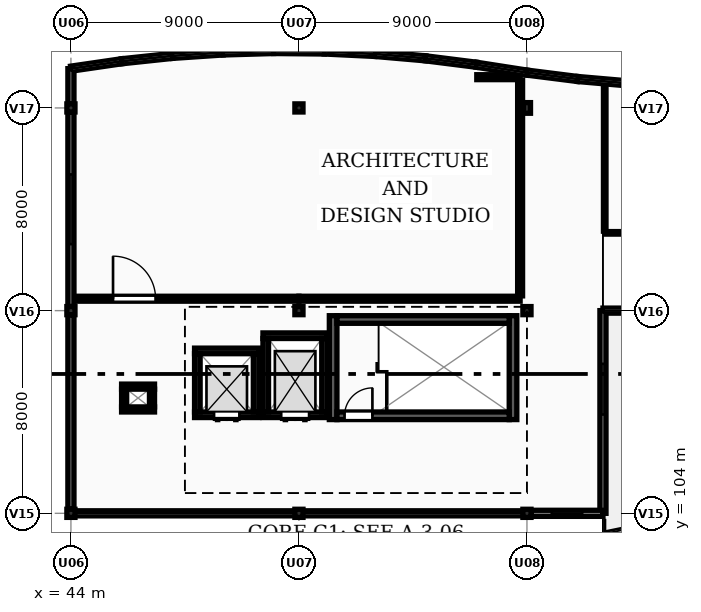
"""IFC4 building model, lengths in metres.
Left out: names, types, materials, properties, quantities, classifications, styles, units other than length and angle.
Written with IfcOpenShell. Run it as: python <this file> out.ifc"""

import sys

from ifc_helpers import new_model, si_unit, direction, frame, frame_2d, origin, origin_2d, place, context, subcontext, project, spatial, rectangle, extrude, element, fill, save


model = new_model("IFC4")
c1 = context("Model", 3, precision=1e-05, world=origin(), true_north=direction((0.0, 1.0)))
c2 = subcontext(c1, "Body", "Model", "MODEL_VIEW")
j1 = project(units=[si_unit("LENGTHUNIT", "METRE"), si_unit("PLANEANGLEUNIT", "RADIAN")], contexts=[c1])
p1 = place(None, origin())
s1 = spatial("IfcSite", under=j1, at=p1, CompositionType="ELEMENT")
p2 = place(p1, origin())
s2 = spatial("IfcBuilding", under=s1, at=p2, CompositionType="ELEMENT")
p3 = place(p2, frame((0.0, 0.0, 20.1)))
s3 = spatial("IfcBuildingStorey", under=s2, at=p3, CompositionType="ELEMENT", Elevation=20.1)
p4 = place(p3, frame((44.0, 104.0, 0.0), z_axis=(0.0, 0.0, 1.0), x_axis=(1.0, 0.0, 0.0)))
e1 = element("IfcColumn", 1, at=p4, inside=s3, PredefinedType="COLUMN", context=c2, shape_type="SweptSolid", body=[
    extrude(rectangle(XDim=0.32, YDim=0.32, at=origin_2d()), origin(), (0.0, 0.0, 1.0), 4.123),
])
p5 = place(p3, frame((44.0, 112.0, 0.0), z_axis=(0.0, 0.0, 1.0), x_axis=(1.0, 0.0, 0.0)))
e2 = element("IfcColumn", 2, at=p5, inside=s3, PredefinedType="COLUMN", context=c2, shape_type="SweptSolid", body=[
    extrude(rectangle(XDim=0.32, YDim=0.32, at=origin_2d()), origin(), (0.0, 0.0, 1.0), 4.468),
])
p6 = place(p3, frame((44.0, 120.0, 0.0), z_axis=(0.0, 0.0, 1.0), x_axis=(1.0, 0.0, 0.0)))
e3 = element("IfcColumn", 3, at=p6, inside=s3, PredefinedType="COLUMN", context=c2, shape_type="SweptSolid", body=[
    extrude(rectangle(XDim=0.32, YDim=0.32, at=origin_2d()), origin(), (0.0, 0.0, 1.0), 4.813),
])
p7 = place(p3, frame((53.0, 104.0, 0.0), z_axis=(0.0, 0.0, 1.0), x_axis=(1.0, 0.0, 0.0)))
e4 = element("IfcColumn", 4, at=p7, inside=s3, PredefinedType="COLUMN", context=c2, shape_type="SweptSolid", body=[
    extrude(rectangle(XDim=0.32, YDim=0.32, at=origin_2d()), origin(), (0.0, 0.0, 1.0), 3.801),
])
p8 = place(p3, frame((53.0, 112.0, 0.0), z_axis=(0.0, 0.0, 1.0), x_axis=(1.0, 0.0, 0.0)))
e5 = element("IfcColumn", 5, at=p8, inside=s3, PredefinedType="COLUMN", context=c2, shape_type="SweptSolid", body=[
    extrude(rectangle(XDim=0.32, YDim=0.32, at=origin_2d()), origin(), (0.0, 0.0, 1.0), 4.146),
])
p9 = place(p3, frame((53.0, 120.0, 0.0), z_axis=(0.0, 0.0, 1.0), x_axis=(1.0, 0.0, 0.0)))
e6 = element("IfcColumn", 6, at=p9, inside=s3, PredefinedType="COLUMN", context=c2, shape_type="SweptSolid", body=[
    extrude(rectangle(XDim=0.32, YDim=0.32, at=origin_2d()), origin(), (0.0, 0.0, 1.0), 4.491),
])
p10 = place(p3, frame((62.0, 104.0, 0.0), z_axis=(0.0, 0.0, 1.0), x_axis=(1.0, 0.0, 0.0)))
e7 = element("IfcColumn", 7, at=p10, inside=s3, PredefinedType="COLUMN", context=c2, shape_type="SweptSolid", body=[
    extrude(rectangle(XDim=0.32, YDim=0.32, at=origin_2d()), origin(), (0.0, 0.0, 1.0), 3.479),
])
p11 = place(p3, frame((62.0, 112.0, 0.0), z_axis=(0.0, 0.0, 1.0), x_axis=(1.0, 0.0, 0.0)))
e8 = element("IfcColumn", 8, at=p11, inside=s3, PredefinedType="COLUMN", context=c2, shape_type="SweptSolid", body=[
    extrude(rectangle(XDim=0.32, YDim=0.32, at=origin_2d()), origin(), (0.0, 0.0, 1.0), 3.824),
])
p12 = place(p3, frame((62.0, 120.0, 0.0), z_axis=(0.0, 0.0, 1.0), x_axis=(1.0, 0.0, 0.0)))
e9 = element("IfcColumn", 9, at=p12, inside=s3, PredefinedType="PILASTER", context=c2, shape_type="SweptSolid", body=[
    extrude(rectangle(XDim=0.28, YDim=0.42, at=origin_2d()), origin(), (0.0, 0.0, 1.0), 4.169),
])
p13 = place(p3, frame((44.0, 121.55, 0.0), z_axis=(0.0, 0.0, 1.0), x_axis=(0.989544477223, 0.144228040259, 0.0)))
e10 = element("IfcWall", 10, at=p13, inside=s3, PredefinedType="SOLIDWALL", context=c2, shape_type="SweptSolid", body=[
    extrude(rectangle(XDim=2.021, YDim=0.2, at=frame_2d((1.011, 0.0))), origin(), (0.0, 0.0, 1.0), 0.95),
])
p14 = place(p3, frame((46.0, 121.842, 0.0), z_axis=(0.0, 0.0, 1.0), x_axis=(0.994395160059, 0.105727317433, 0.0)))
e11 = element("IfcWall", 11, at=p14, inside=s3, PredefinedType="SOLIDWALL", context=c2, shape_type="SweptSolid", body=[
    extrude(rectangle(XDim=2.011, YDim=0.2, at=frame_2d((1.006, 0.0))), origin(), (0.0, 0.0, 1.0), 0.95),
])
p15 = place(p3, frame((48.0, 122.054, 0.0), z_axis=(0.0, 0.0, 1.0), x_axis=(0.997729302978, 0.067351599676, 0.0)))
e12 = element("IfcWall", 12, at=p15, inside=s3, PredefinedType="SOLIDWALL", context=c2, shape_type="SweptSolid", body=[
    extrude(rectangle(XDim=2.005, YDim=0.2, at=frame_2d((1.002, 0.0))), origin(), (0.0, 0.0, 1.0), 0.95),
])
p16 = place(p3, frame((50.0, 122.189, 0.0), z_axis=(0.0, 0.0, 1.0), x_axis=(0.999581770858, 0.028918564416, 0.0)))
e13 = element("IfcWall", 13, at=p16, inside=s3, PredefinedType="SOLIDWALL", context=c2, shape_type="SweptSolid", body=[
    extrude(rectangle(XDim=2.001, YDim=0.2, at=frame_2d((1.0, 0.0))), origin(), (0.0, 0.0, 1.0), 0.95),
])
p17 = place(p3, frame((52.0, 122.247, 0.0), z_axis=(0.0, 0.0, 1.0), x_axis=(0.999953504169, -0.009643106302, 0.0)))
e14 = element("IfcWall", 14, at=p17, inside=s3, PredefinedType="SOLIDWALL", context=c2, shape_type="SweptSolid", body=[
    extrude(rectangle(XDim=2.0, YDim=0.2, at=frame_2d((1.0, 0.0))), origin(), (0.0, 0.0, 1.0), 0.95),
])
p18 = place(p3, frame((54.0, 122.228, 0.0), z_axis=(0.0, 0.0, 1.0), x_axis=(0.99884540439, -0.048040172037, 0.0)))
e15 = element("IfcWall", 15, at=p18, inside=s3, PredefinedType="SOLIDWALL", context=c2, shape_type="SweptSolid", body=[
    extrude(rectangle(XDim=2.002, YDim=0.2, at=frame_2d((1.001, 0.0))), origin(), (0.0, 0.0, 1.0), 0.95),
])
p19 = place(p3, frame((56.0, 122.132, 0.0), z_axis=(0.0, 0.0, 1.0), x_axis=(0.996244237948, -0.086587633962, 0.0)))
e16 = element("IfcWall", 16, at=p19, inside=s3, PredefinedType="SOLIDWALL", context=c2, shape_type="SweptSolid", body=[
    extrude(rectangle(XDim=2.008, YDim=0.2, at=frame_2d((1.004, 0.0))), origin(), (0.0, 0.0, 1.0), 0.95),
])
p20 = place(p3, frame((58.0, 121.958, 0.0), z_axis=(0.0, 0.0, 1.0), x_axis=(0.992158168336, -0.124988675503, 0.0)))
e17 = element("IfcWall", 17, at=p20, inside=s3, PredefinedType="SOLIDWALL", context=c2, shape_type="SweptSolid", body=[
    extrude(rectangle(XDim=2.016, YDim=0.2, at=frame_2d((1.008, 0.0))), origin(), (0.0, 0.0, 1.0), 0.95),
])
p21 = place(p3, frame((60.0, 121.706, 0.0), z_axis=(0.0, 0.0, 1.0), x_axis=(0.988085509852, -0.153905897287, 0.0)))
e18 = element("IfcWall", 18, at=p21, inside=s3, PredefinedType="SOLIDWALL", context=c2, shape_type="SweptSolid", body=[
    extrude(rectangle(XDim=2.024, YDim=0.2, at=frame_2d((1.012, 0.0))), origin(), (0.0, 0.0, 1.0), 0.95),
])
p22 = place(p3, frame((62.0, 121.394, 0.0), z_axis=(0.0, 0.0, 1.0), x_axis=(0.992158168336, -0.124988675503, 0.0)))
e19 = element("IfcWall", 19, at=p22, inside=s3, PredefinedType="SOLIDWALL", context=c2, shape_type="SweptSolid", body=[
    extrude(rectangle(XDim=2.016, YDim=0.2, at=frame_2d((1.008, 0.0))), origin(), (0.0, 0.0, 1.0), 0.95),
])
p23 = place(p3, frame((64.0, 121.142, 0.0), z_axis=(0.0, 0.0, 1.0), x_axis=(0.996244237948, -0.086587633962, 0.0)))
e20 = element("IfcWall", 20, at=p23, inside=s3, PredefinedType="SOLIDWALL", context=c2, shape_type="SweptSolid", body=[
    extrude(rectangle(XDim=2.008, YDim=0.2, at=frame_2d((1.004, 0.0))), origin(), (0.0, 0.0, 1.0), 0.95),
])
p24 = place(p3, frame((70.84, 112.0, 0.0), z_axis=(0.0, 0.0, 1.0), x_axis=(-1.0, 0.0, 0.0)))
e21 = element("IfcWall", 21, at=p24, inside=s3, PredefinedType="SOLIDWALL", context=c2, shape_type="SweptSolid", body=[
    extrude(rectangle(XDim=5.84, YDim=0.2, at=frame_2d((2.92, 0.0))), origin(), (0.0, 0.0, 1.0), 0.95),
])
p25 = place(p3, frame((65.0, 112.0, 0.0), z_axis=(0.0, 0.0, 1.0), x_axis=(0.0, -1.0, 0.0)))
e22 = element("IfcWall", 22, at=p25, inside=s3, PredefinedType="SOLIDWALL", context=c2, shape_type="SweptSolid", body=[
    extrude(rectangle(XDim=8.0, YDim=0.24, at=frame_2d((4.0, 0.0))), origin(), (0.0, 0.0, 1.0), 3.372),
])
p26 = place(p25, frame((2.1, 0.0, 0.95)))
e23 = element("IfcOpeningElement", 23, at=p26, cuts=e22, PredefinedType="OPENING", context=c2, shape_type="SweptSolid", body=[
    extrude(rectangle(XDim=2.0, YDim=1.65, at=frame_2d((1.0, 0.825))), frame((0.0, 0.13, 0.0), z_axis=(0.0, -1.0, 0.0), x_axis=(1.0, 0.0, 0.0)), (0.0, 0.0, 1.0), 0.26),
])
p27 = place(p3, frame((65.0, 104.0, 0.0), z_axis=(0.0, 0.0, 1.0), x_axis=(-1.0, 0.0, 0.0)))
e24 = element("IfcWall", 24, at=p27, inside=s3, PredefinedType="SOLIDWALL", context=c2, shape_type="SweptSolid", body=[
    extrude(rectangle(XDim=2.84, YDim=0.24, at=frame_2d((1.42, 0.0))), origin(), (0.0, 0.0, 1.0), 3.372),
])
p28 = place(p27, frame((0.82, 0.0, 0.95)))
e25 = element("IfcOpeningElement", 25, at=p28, cuts=e24, PredefinedType="OPENING", context=c2, shape_type="SweptSolid", body=[
    extrude(rectangle(XDim=1.2, YDim=1.2, at=frame_2d((0.6, 0.6))), frame((0.0, 0.13, 0.0), z_axis=(0.0, -1.0, 0.0), x_axis=(1.0, 0.0, 0.0)), (0.0, 0.0, 1.0), 0.26),
])
for number, where, z_axis, x_axis in (
    (26, (61.84, 104.0, 0.0), (0.0, 0.0, 1.0), (-1.0, 0.0, 0.0)),
    (27, (52.84, 104.0, 0.0), (0.0, 0.0, 1.0), (-1.0, 0.0, 0.0)),
):
    element("IfcWall", number, at=place(p3, frame(where, z_axis=z_axis, x_axis=x_axis)), inside=s3, PredefinedType="SOLIDWALL", context=c2, shape_type="SweptSolid", body=[
        extrude(rectangle(XDim=8.68, YDim=0.2, at=frame_2d((4.34, 0.0))), origin(), (0.0, 0.0, 1.0), 0.95),
    ])
p29 = place(p3, frame((44.0, 104.16, 0.0), z_axis=(0.0, 0.0, 1.0), x_axis=(0.0, 1.0, 0.0)))
e28 = element("IfcWall", 28, at=p29, inside=s3, PredefinedType="SOLIDWALL", context=c2, shape_type="SweptSolid", body=[
    extrude(rectangle(XDim=7.68, YDim=0.24, at=frame_2d((3.84, 0.0))), origin(), (0.0, 0.0, 1.0), 3.74),
])
p30 = place(p3, frame((44.0, 112.16, 0.0), z_axis=(0.0, 0.0, 1.0), x_axis=(0.0, 1.0, 0.0)))
e29 = element("IfcWall", 29, at=p30, inside=s3, PredefinedType="SOLIDWALL", context=c2, shape_type="SweptSolid", body=[
    extrude(rectangle(XDim=7.68, YDim=0.24, at=frame_2d((3.84, 0.0))), origin(), (0.0, 0.0, 1.0), 4.085),
])
p31 = place(p30, frame((2.465, 0.0, 0.95)))
e30 = element("IfcOpeningElement", 30, at=p31, cuts=e29, PredefinedType="OPENING", context=c2, shape_type="SweptSolid", body=[
    extrude(rectangle(XDim=2.75, YDim=1.65, at=frame_2d((1.375, 0.825))), frame((0.0, 0.13, 0.0), z_axis=(0.0, -1.0, 0.0), x_axis=(1.0, 0.0, 0.0)), (0.0, 0.0, 1.0), 0.26),
])
p32 = place(p3, frame((44.0, 120.16, 0.0), z_axis=(0.0, 0.0, 1.0), x_axis=(0.0, 1.0, 0.0)))
e31 = element("IfcWall", 31, at=p32, inside=s3, PredefinedType="SOLIDWALL", context=c2, shape_type="SweptSolid", body=[
    extrude(rectangle(XDim=1.39, YDim=0.24, at=frame_2d((0.695, 0.0))), origin(), (0.0, 0.0, 1.0), 4.813),
])
for number, where, z_axis, x_axis in (
    (32, (54.35, 107.7, 0.0), (0.0, 0.0, 1.0), (0.0, 1.0, 0.0)),
    (33, (61.45, 111.8, 0.0), (0.0, 0.0, 1.0), (0.0, -1.0, 0.0)),
):
    element("IfcWall", number, at=place(p3, frame(where, z_axis=z_axis, x_axis=x_axis)), inside=s3, PredefinedType="SHEAR", context=c2, shape_type="SweptSolid", body=[
        extrude(rectangle(XDim=4.1, YDim=0.3, at=frame_2d((2.05, 0.0))), origin(), (0.0, 0.0, 1.0), 3.653),
    ])
p33 = place(p3, frame((54.5, 107.85, 0.0), z_axis=(0.0, 0.0, 1.0), x_axis=(1.0, 0.0, 0.0)))
e34 = element("IfcWall", 34, at=p33, inside=s3, PredefinedType="SHEAR", context=c2, shape_type="SweptSolid", body=[
    extrude(rectangle(XDim=6.8, YDim=0.3, at=frame_2d((3.4, 0.0))), origin(), (0.0, 0.0, 1.0), 3.653),
])
p34 = place(p33, frame((0.3, 0.0, 0.0)))
e35 = element("IfcOpeningElement", 35, at=p34, cuts=e34, PredefinedType="OPENING", context=c2, shape_type="SweptSolid", body=[
    extrude(rectangle(XDim=1.1, YDim=2.15, at=frame_2d((0.55, 1.075))), frame((0.0, 0.16, 0.0), z_axis=(0.0, -1.0, 0.0), x_axis=(1.0, 0.0, 0.0)), (0.0, 0.0, 1.0), 0.32),
])
p35 = place(p3, frame((61.3, 111.65, 0.0), z_axis=(0.0, 0.0, 1.0), x_axis=(-1.0, 0.0, 0.0)))
e36 = element("IfcWall", 36, at=p35, inside=s3, PredefinedType="SHEAR", context=c2, shape_type="SweptSolid", body=[
    extrude(rectangle(XDim=6.8, YDim=0.3, at=frame_2d((3.4, 0.0))), origin(), (0.0, 0.0, 1.0), 3.653),
])
p36 = place(p3, frame((54.12, 107.89, 0.0), z_axis=(0.0, 0.0, 1.0), x_axis=(-1.0, 0.0, 0.0)))
e37 = element("IfcWall", 37, at=p36, inside=s3, PredefinedType="SHEAR", context=c2, shape_type="SweptSolid", body=[
    extrude(rectangle(XDim=2.54, YDim=0.22, at=frame_2d((1.27, 0.0))), origin(), (0.0, 0.0, 1.0), 4.591),
])
p37 = place(p36, frame((0.72, 0.0, 0.0)))
e38 = element("IfcOpeningElement", 38, at=p37, cuts=e37, PredefinedType="OPENING", context=c2, shape_type="SweptSolid", body=[
    extrude(rectangle(XDim=1.1, YDim=2.15, at=frame_2d((0.55, 1.075))), frame((0.0, 0.12, 0.0), z_axis=(0.0, -1.0, 0.0), x_axis=(1.0, 0.0, 0.0)), (0.0, 0.0, 1.0), 0.24),
])
p38 = place(p3, frame((51.58, 111.01, 0.0), z_axis=(0.0, 0.0, 1.0), x_axis=(1.0, 0.0, 0.0)))
e39 = element("IfcWall", 39, at=p38, inside=s3, PredefinedType="SHEAR", context=c2, shape_type="SweptSolid", body=[
    extrude(rectangle(XDim=2.54, YDim=0.22, at=frame_2d((1.27, 0.0))), origin(), (0.0, 0.0, 1.0), 4.591),
])
for number, where, z_axis, x_axis in (
    (40, (51.69, 108.0, 0.0), (0.0, 0.0, 1.0), (0.0, 1.0, 0.0)),
    (41, (54.01, 110.9, 0.0), (0.0, 0.0, 1.0), (0.0, -1.0, 0.0)),
):
    element("IfcWall", number, at=place(p3, frame(where, z_axis=z_axis, x_axis=x_axis)), inside=s3, PredefinedType="SHEAR", context=c2, shape_type="SweptSolid", body=[
        extrude(rectangle(XDim=2.9, YDim=0.22, at=frame_2d((1.45, 0.0))), origin(), (0.0, 0.0, 1.0), 4.591),
    ])
p39 = place(p3, frame((51.42, 107.89, 0.0), z_axis=(0.0, 0.0, 1.0), x_axis=(-1.0, 0.0, 0.0)))
e42 = element("IfcWall", 42, at=p39, inside=s3, PredefinedType="SHEAR", context=c2, shape_type="SweptSolid", body=[
    extrude(rectangle(XDim=2.54, YDim=0.22, at=frame_2d((1.27, 0.0))), origin(), (0.0, 0.0, 1.0), 4.675),
])
p40 = place(p39, frame((0.77, 0.0, 0.0)))
e43 = element("IfcOpeningElement", 43, at=p40, cuts=e42, PredefinedType="OPENING", context=c2, shape_type="SweptSolid", body=[
    extrude(rectangle(XDim=1.0, YDim=2.15, at=frame_2d((0.5, 1.075))), frame((0.0, 0.12, 0.0), z_axis=(0.0, -1.0, 0.0), x_axis=(1.0, 0.0, 0.0)), (0.0, 0.0, 1.0), 0.24),
])
p41 = place(p3, frame((48.88, 110.41, 0.0), z_axis=(0.0, 0.0, 1.0), x_axis=(1.0, 0.0, 0.0)))
e44 = element("IfcWall", 44, at=p41, inside=s3, PredefinedType="SHEAR", context=c2, shape_type="SweptSolid", body=[
    extrude(rectangle(XDim=2.54, YDim=0.22, at=frame_2d((1.27, 0.0))), origin(), (0.0, 0.0, 1.0), 4.675),
])
for number, where, z_axis, x_axis in (
    (45, (48.99, 108.0, 0.0), (0.0, 0.0, 1.0), (0.0, 1.0, 0.0)),
    (46, (51.31, 110.3, 0.0), (0.0, 0.0, 1.0), (0.0, -1.0, 0.0)),
):
    element("IfcWall", number, at=place(p3, frame(where, z_axis=z_axis, x_axis=x_axis)), inside=s3, PredefinedType="SHEAR", context=c2, shape_type="SweptSolid", body=[
        extrude(rectangle(XDim=2.3, YDim=0.22, at=frame_2d((1.15, 0.0))), origin(), (0.0, 0.0, 1.0), 4.675),
    ])
for number, where, z_axis, x_axis in (
    (47, (47.3, 108.1, 0.0), (0.0, 0.0, 1.0), (-1.0, 0.0, 0.0)),
    (48, (46.0, 109.0, 0.0), (0.0, 0.0, 1.0), (1.0, 0.0, 0.0)),
):
    element("IfcWall", number, at=place(p3, frame(where, z_axis=z_axis, x_axis=x_axis)), inside=s3, PredefinedType="PARTITIONING", context=c2, shape_type="SweptSolid", body=[
        extrude(rectangle(XDim=1.3, YDim=0.2, at=frame_2d((0.65, 0.0))), origin(), (0.0, 0.0, 1.0), 3.65),
    ])
for number, where, z_axis, x_axis in (
    (49, (46.1, 108.2, 0.0), (0.0, 0.0, 1.0), (0.0, 1.0, 0.0)),
    (50, (47.2, 108.9, 0.0), (0.0, 0.0, 1.0), (0.0, -1.0, 0.0)),
):
    element("IfcWall", number, at=place(p3, frame(where, z_axis=z_axis, x_axis=x_axis)), inside=s3, PredefinedType="PARTITIONING", context=c2, shape_type="SweptSolid", body=[
        extrude(rectangle(XDim=0.7, YDim=0.2, at=frame_2d((0.35, 0.0))), origin(), (0.0, 0.0, 1.0), 3.65),
    ])
p42 = place(p3, frame((44.162, 112.47, 0.0), z_axis=(0.0, 0.0, 1.0), x_axis=(1.0, 0.0, 0.0)))
e51 = element("IfcWall", 51, at=p42, inside=s3, PredefinedType="PARTITIONING", context=c2, shape_type="SweptSolid", body=[
    extrude(rectangle(XDim=8.838, YDim=0.195, at=frame_2d((4.419, 0.0))), origin(), (0.0, 0.0, 1.0), 3.65),
])
p43 = place(p42, frame((1.5, 0.0, 0.0)))
e52 = element("IfcOpeningElement", 52, at=p43, cuts=e51, PredefinedType="OPENING", context=c2, shape_type="SweptSolid", body=[
    extrude(rectangle(XDim=1.68, YDim=2.2, at=frame_2d((0.84, 1.1))), frame((0.0, 0.107, 0.0), z_axis=(0.0, -1.0, 0.0), x_axis=(1.0, 0.0, 0.0)), (0.0, 0.0, 1.0), 0.215),
])
p44 = place(p3, frame((53.0, 112.47, 0.0), z_axis=(0.0, 0.0, 1.0), x_axis=(1.0, 0.0, 0.0)))
e53 = element("IfcWall", 53, at=p44, inside=s3, PredefinedType="PARTITIONING", context=c2, shape_type="SweptSolid", body=[
    extrude(rectangle(XDim=8.73, YDim=0.195, at=frame_2d((4.365, 0.0))), origin(), (0.0, 0.0, 1.0), 3.65),
])
p45 = place(p3, frame((60.02, 121.214, 0.0), z_axis=(0.0, 0.0, 1.0), x_axis=(1.0, 0.0, 0.0)))
e54 = element("IfcWall", 54, at=p45, inside=s3, PredefinedType="PARTITIONING", context=c2, shape_type="SweptSolid", body=[
    extrude(rectangle(XDim=1.71, YDim=0.195, at=frame_2d((0.855, 0.0))), origin(), (0.0, 0.0, 1.0), 3.65),
])
p46 = place(p3, frame((61.73, 112.583, 0.0), z_axis=(0.0, 0.0, 1.0), x_axis=(0.0, 1.0, 0.0)))
e55 = element("IfcWall", 55, at=p46, inside=s3, PredefinedType="PARTITIONING", context=c2, shape_type="SweptSolid", body=[
    extrude(rectangle(XDim=8.519, YDim=0.195, at=frame_2d((4.26, 0.0))), origin(), (0.0, 0.0, 1.0), 3.65),
])
p47 = place(p3, frame((65.07, 115.07, 0.0), z_axis=(0.0, 0.0, 1.0), x_axis=(1.0, 0.0, 0.0)))
e56 = element("IfcWall", 56, at=p47, inside=s3, PredefinedType="PARTITIONING", context=c2, shape_type="SweptSolid", body=[
    extrude(rectangle(XDim=5.93, YDim=0.1, at=frame_2d((2.965, 0.0))), origin(), (0.0, 0.0, 1.0), 3.65),
])
p48 = place(p3, frame((65.07, 115.135, 0.0), z_axis=(0.0, 0.0, 1.0), x_axis=(0.0, 1.0, 0.0)))
e57 = element("IfcWall", 57, at=p48, inside=s3, PredefinedType="PARTITIONING", context=c2, shape_type="SweptSolid", body=[
    extrude(rectangle(XDim=5.772, YDim=0.1, at=frame_2d((2.886, 0.0))), origin(), (0.0, 0.0, 1.0), 3.65),
])
p49 = place(p26, origin())
e58 = element("IfcWindow", 58, at=p49, inside=s3, PartitioningType="DOUBLE_PANEL_VERTICAL", PredefinedType="WINDOW", context=c2, shape_type="SweptSolid", body=[
    extrude(rectangle(XDim=2.0, YDim=1.65, at=frame_2d((1.0, 0.825))), frame((0.0, 0.03, 0.0), z_axis=(0.0, -1.0, 0.0), x_axis=(1.0, 0.0, 0.0)), (0.0, 0.0, 1.0), 0.06),
])
fill(e23, e58)
p50 = place(p28, origin())
e59 = element("IfcWindow", 59, at=p50, inside=s3, PartitioningType="SINGLE_PANEL", PredefinedType="WINDOW", context=c2, shape_type="SweptSolid", body=[
    extrude(rectangle(XDim=1.2, YDim=1.2, at=frame_2d((0.6, 0.6))), frame((0.0, 0.03, 0.0), z_axis=(0.0, -1.0, 0.0), x_axis=(1.0, 0.0, 0.0)), (0.0, 0.0, 1.0), 0.06),
])
fill(e25, e59)
p51 = place(p31, origin())
e60 = element("IfcWindow", 60, at=p51, inside=s3, PartitioningType="DOUBLE_PANEL_VERTICAL", PredefinedType="WINDOW", context=c2, shape_type="SweptSolid", body=[
    extrude(rectangle(XDim=2.75, YDim=1.65, at=frame_2d((1.375, 0.825))), frame((0.0, 0.03, 0.0), z_axis=(0.0, -1.0, 0.0), x_axis=(1.0, 0.0, 0.0)), (0.0, 0.0, 1.0), 0.06),
])
fill(e30, e60)
p52 = place(p34, origin())
e61 = element("IfcDoor", 61, at=p52, inside=s3, OperationType="SINGLE_SWING_RIGHT", PredefinedType="DOOR", context=c2, shape_type="SweptSolid", body=[
    extrude(rectangle(XDim=1.1, YDim=2.15, at=frame_2d((0.55, 1.075))), frame((0.0, 0.025, 0.0), z_axis=(0.0, -1.0, 0.0), x_axis=(1.0, 0.0, 0.0)), (0.0, 0.0, 1.0), 0.05),
])
fill(e35, e61)
p53 = place(p37, origin())
e62 = element("IfcDoor", 62, at=p53, inside=s3, OperationType="DOUBLE_DOOR_SLIDING", PredefinedType="DOOR", context=c2, shape_type="SweptSolid", body=[
    extrude(rectangle(XDim=1.1, YDim=2.15, at=frame_2d((0.55, 1.075))), frame((0.0, 0.025, 0.0), z_axis=(0.0, -1.0, 0.0), x_axis=(1.0, 0.0, 0.0)), (0.0, 0.0, 1.0), 0.05),
])
fill(e38, e62)
p54 = place(p40, origin())
e63 = element("IfcDoor", 63, at=p54, inside=s3, OperationType="DOUBLE_DOOR_SLIDING", PredefinedType="DOOR", context=c2, shape_type="SweptSolid", body=[
    extrude(rectangle(XDim=1.0, YDim=2.15, at=frame_2d((0.5, 1.075))), frame((0.0, 0.025, 0.0), z_axis=(0.0, -1.0, 0.0), x_axis=(1.0, 0.0, 0.0)), (0.0, 0.0, 1.0), 0.05),
])
fill(e43, e63)
p55 = place(p43, origin())
e64 = element("IfcDoor", 64, at=p55, inside=s3, OperationType="SINGLE_SWING_LEFT", PredefinedType="DOOR", context=c2, shape_type="SweptSolid", body=[
    extrude(rectangle(XDim=1.68, YDim=2.2, at=frame_2d((0.84, 1.1))), frame((0.0, 0.025, 0.0), z_axis=(0.0, -1.0, 0.0), x_axis=(1.0, 0.0, 0.0)), (0.0, 0.0, 1.0), 0.05),
])
fill(e52, e64)
save(model, sys.argv[1])
